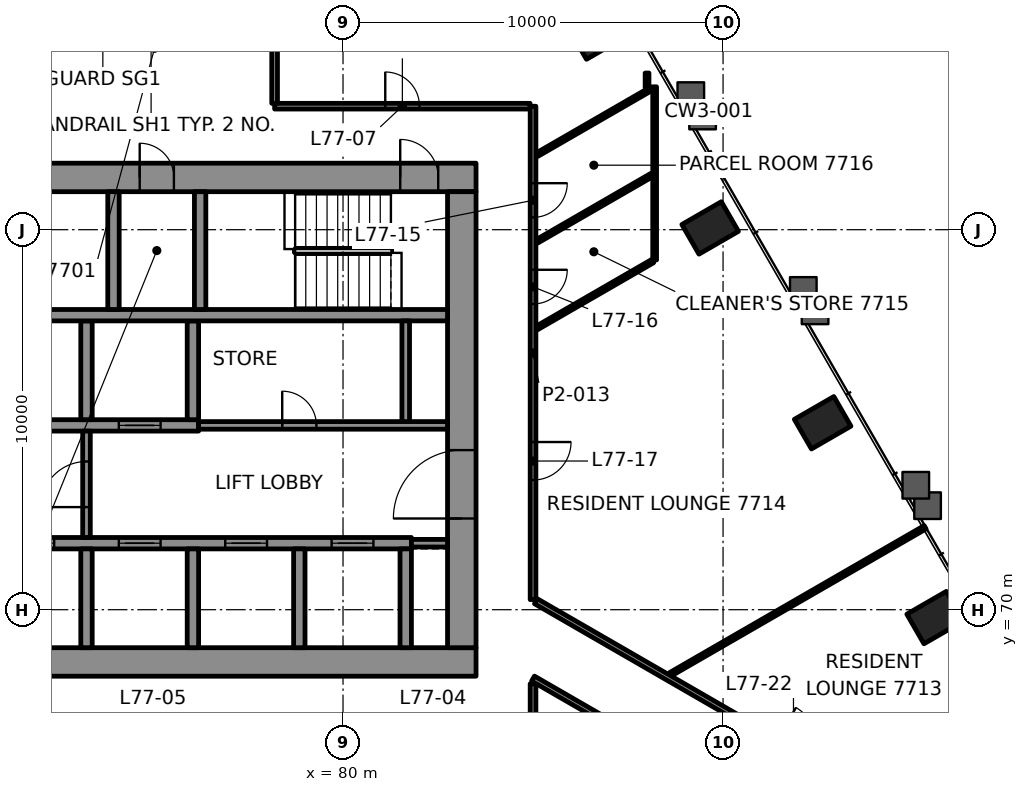
"""IFC4 building model, lengths in metres.
Left out: names, types, materials, properties, quantities, classifications, styles, units other than length and angle.
Written with IfcOpenShell. Run it as: python <this file> out.ifc"""

import sys

from ifc_helpers import new_model, si_unit, direction, frame, frame_2d, origin, origin_2d, place, context, subcontext, project, spatial, rectangle, hollow_rectangle, extrude, element, fill, save


model = new_model("IFC4")
c1 = context("Model", 3, precision=1e-05, world=origin(), true_north=direction((0.0, 1.0)))
c2 = subcontext(c1, "Body", "Model", "MODEL_VIEW")
j1 = project(units=[si_unit("LENGTHUNIT", "METRE"), si_unit("PLANEANGLEUNIT", "RADIAN")], contexts=[c1])
p1 = place(None, origin())
s1 = spatial("IfcSite", under=j1, at=p1, CompositionType="ELEMENT")
p2 = place(p1, origin())
s2 = spatial("IfcBuilding", under=s1, at=p2, CompositionType="ELEMENT")
p3 = place(p2, frame((0.0, 0.0, 316.1)))
s3 = spatial("IfcBuildingStorey", under=s2, at=p3, CompositionType="ELEMENT", Elevation=316.1)
for number, where, z_axis, x_axis in (
    (1, (95.581, 69.793, -0.0), (0.0, 0.0, 1.0), (-0.5, 0.866, 0.0)),
    (2, (92.621, 74.919, -0.0), (0.0, 0.0, 1.0), (-0.5, 0.866, 0.0)),
    (3, (89.661, 80.046, -0.0), (0.0, 0.0, 1.0), (-0.5, 0.866, 0.0)),
    (4, (86.701, 85.173, -0.0), (0.0, 0.0, 1.0), (-0.5, 0.866, 0.0)),
):
    element("IfcColumn", number, at=place(p3, frame(where, z_axis=z_axis, x_axis=x_axis)), inside=s3, PredefinedType="COLUMN", context=c2, shape_type="SweptSolid", body=[
        extrude(hollow_rectangle(XDim=0.9, YDim=1.2, WallThickness=0.06, at=origin_2d()), origin(), (0.0, 0.0, 1.0), 3.5),
    ])
p4 = place(p3, frame((66.5, 68.625, 0.0), z_axis=(0.0, 0.0, 1.0), x_axis=(1.0, 0.0, 0.0)))
e5 = element("IfcWall", 5, at=p4, inside=s3, PredefinedType="SHEAR", context=c2, shape_type="SweptSolid", body=[
    extrude(rectangle(XDim=17.0, YDim=0.75, at=frame_2d((8.5, 0.0))), origin(), (0.0, 0.0, 1.0), 3.3),
])
p5 = place(p4, frame((1.9, 0.0, 0.0)))
e6 = element("IfcOpeningElement", 6, at=p5, cuts=e5, PredefinedType="OPENING", context=c2, shape_type="SweptSolid", body=[
    extrude(rectangle(XDim=0.9, YDim=2.1, at=frame_2d((0.45, 1.05))), frame((0.0, 0.385, 0.0), z_axis=(0.0, -1.0, 0.0), x_axis=(1.0, 0.0, 0.0)), (0.0, 0.0, 1.0), 0.77),
])
p6 = place(p3, frame((66.5, 81.375, 0.0), z_axis=(0.0, 0.0, 1.0), x_axis=(1.0, 0.0, 0.0)))
e7 = element("IfcWall", 7, at=p6, inside=s3, PredefinedType="SHEAR", context=c2, shape_type="SweptSolid", body=[
    extrude(rectangle(XDim=17.0, YDim=0.75, at=frame_2d((8.5, 0.0))), origin(), (0.0, 0.0, 1.0), 3.3),
])
p7 = place(p6, frame((1.195, 0.0, 0.0)))
e8 = element("IfcOpeningElement", 8, at=p7, cuts=e7, PredefinedType="OPENING", context=c2, shape_type="SweptSolid", body=[
    extrude(rectangle(XDim=1.0, YDim=2.1, at=frame_2d((0.5, 1.05))), frame((0.0, 0.385, 0.0), z_axis=(0.0, -1.0, 0.0), x_axis=(1.0, 0.0, 0.0)), (0.0, 0.0, 1.0), 0.77),
])
p8 = place(p6, frame((15.005, 0.0, 0.0)))
e9 = element("IfcOpeningElement", 9, at=p8, cuts=e7, PredefinedType="OPENING", context=c2, shape_type="SweptSolid", body=[
    extrude(rectangle(XDim=1.0, YDim=2.1, at=frame_2d((0.5, 1.05))), frame((0.0, 0.385, 0.0), z_axis=(0.0, -1.0, 0.0), x_axis=(1.0, 0.0, 0.0)), (0.0, 0.0, 1.0), 0.77),
])
p9 = place(p6, frame((8.15, 0.0, 0.0)))
e10 = element("IfcOpeningElement", 10, at=p9, cuts=e7, PredefinedType="OPENING", context=c2, shape_type="SweptSolid", body=[
    extrude(rectangle(XDim=0.9, YDim=2.1, at=frame_2d((0.45, 1.05))), frame((0.0, 0.385, 0.0), z_axis=(0.0, -1.0, 0.0), x_axis=(1.0, 0.0, 0.0)), (0.0, 0.0, 1.0), 0.77),
])
p10 = place(p3, frame((83.125, 69.0, 0.0), z_axis=(0.0, 0.0, 1.0), x_axis=(0.0, 1.0, 0.0)))
e11 = element("IfcWall", 11, at=p10, inside=s3, PredefinedType="SHEAR", context=c2, shape_type="SweptSolid", body=[
    extrude(rectangle(XDim=12.0, YDim=0.75, at=frame_2d((6.0, 0.0))), origin(), (0.0, 0.0, 1.0), 3.3),
])
p11 = place(p10, frame((3.4, 0.0, 0.0)))
e12 = element("IfcOpeningElement", 12, at=p11, cuts=e11, PredefinedType="OPENING", context=c2, shape_type="SweptSolid", body=[
    extrude(rectangle(XDim=1.8, YDim=2.1, at=frame_2d((0.9, 1.05))), frame((0.0, 0.385, 0.0), z_axis=(0.0, -1.0, 0.0), x_axis=(1.0, 0.0, 0.0)), (0.0, 0.0, 1.0), 0.77),
])
p12 = place(p3, frame((70.3, 71.75, 0.0), z_axis=(0.0, 0.0, 1.0), x_axis=(1.0, 0.0, 0.0)))
e13 = element("IfcWall", 13, at=p12, inside=s3, PredefinedType="SHEAR", context=c2, shape_type="SweptSolid", body=[
    extrude(rectangle(XDim=11.5, YDim=0.3, at=frame_2d((5.75, 0.0))), origin(), (0.0, 0.0, 1.0), 3.3),
])
p13 = place(p12, frame((1.0, 0.0, 0.0)))
e14 = element("IfcOpeningElement", 14, at=p13, cuts=e13, PredefinedType="OPENING", context=c2, shape_type="SweptSolid", body=[
    extrude(rectangle(XDim=1.1, YDim=2.1, at=frame_2d((0.55, 1.05))), frame((0.0, 0.16, 0.0), z_axis=(0.0, -1.0, 0.0), x_axis=(1.0, 0.0, 0.0)), (0.0, 0.0, 1.0), 0.32),
])
p14 = place(p12, frame((3.8, 0.0, 0.0)))
e15 = element("IfcOpeningElement", 15, at=p14, cuts=e13, PredefinedType="OPENING", context=c2, shape_type="SweptSolid", body=[
    extrude(rectangle(XDim=1.1, YDim=2.1, at=frame_2d((0.55, 1.05))), frame((0.0, 0.16, 0.0), z_axis=(0.0, -1.0, 0.0), x_axis=(1.0, 0.0, 0.0)), (0.0, 0.0, 1.0), 0.32),
])
p15 = place(p12, frame((6.6, 0.0, 0.0)))
e16 = element("IfcOpeningElement", 16, at=p15, cuts=e13, PredefinedType="OPENING", context=c2, shape_type="SweptSolid", body=[
    extrude(rectangle(XDim=1.1, YDim=2.1, at=frame_2d((0.55, 1.05))), frame((0.0, 0.16, 0.0), z_axis=(0.0, -1.0, 0.0), x_axis=(1.0, 0.0, 0.0)), (0.0, 0.0, 1.0), 0.32),
])
p16 = place(p12, frame((9.4, 0.0, 0.0)))
e17 = element("IfcOpeningElement", 17, at=p16, cuts=e13, PredefinedType="OPENING", context=c2, shape_type="SweptSolid", body=[
    extrude(rectangle(XDim=1.1, YDim=2.1, at=frame_2d((0.55, 1.05))), frame((0.0, 0.16, 0.0), z_axis=(0.0, -1.0, 0.0), x_axis=(1.0, 0.0, 0.0)), (0.0, 0.0, 1.0), 0.32),
])
p17 = place(p3, frame((70.3, 74.85, 0.0), z_axis=(0.0, 0.0, 1.0), x_axis=(1.0, 0.0, 0.0)))
e18 = element("IfcWall", 18, at=p17, inside=s3, PredefinedType="SHEAR", context=c2, shape_type="SweptSolid", body=[
    extrude(rectangle(XDim=5.9, YDim=0.3, at=frame_2d((2.95, 0.0))), origin(), (0.0, 0.0, 1.0), 3.3),
])
p18 = place(p17, frame((3.8, 0.0, 0.0)))
e19 = element("IfcOpeningElement", 19, at=p18, cuts=e18, PredefinedType="OPENING", context=c2, shape_type="SweptSolid", body=[
    extrude(rectangle(XDim=1.1, YDim=2.1, at=frame_2d((0.55, 1.05))), frame((0.0, 0.16, 0.0), z_axis=(0.0, -1.0, 0.0), x_axis=(1.0, 0.0, 0.0)), (0.0, 0.0, 1.0), 0.32),
])
for number, where, z_axis, x_axis in (
    (20, (73.25, 69.0, 0.0), (0.0, 0.0, 1.0), (0.0, 1.0, 0.0)),
    (21, (73.25, 75.0, 0.0), (0.0, 0.0, 1.0), (0.0, 1.0, 0.0)),
    (22, (76.05, 69.0, 0.0), (0.0, 0.0, 1.0), (0.0, 1.0, 0.0)),
    (23, (76.05, 75.0, 0.0), (0.0, 0.0, 1.0), (0.0, 1.0, 0.0)),
    (24, (78.85, 69.0, 0.0), (0.0, 0.0, 1.0), (0.0, 1.0, 0.0)),
    (25, (81.65, 69.0, 0.0), (0.0, 0.0, 1.0), (0.0, 1.0, 0.0)),
):
    element("IfcWall", number, at=place(p3, frame(where, z_axis=z_axis, x_axis=x_axis)), inside=s3, PredefinedType="SHEAR", context=c2, shape_type="SweptSolid", body=[
        extrude(rectangle(XDim=2.6, YDim=0.3, at=frame_2d((1.3, 0.0))), origin(), (0.0, 0.0, 1.0), 3.3),
    ])
p19 = place(p3, frame((67.25, 77.75, 0.0), z_axis=(0.0, 0.0, 1.0), x_axis=(1.0, 0.0, 0.0)))
e26 = element("IfcWall", 26, at=p19, inside=s3, PredefinedType="SHEAR", context=c2, shape_type="SweptSolid", body=[
    extrude(rectangle(XDim=15.5, YDim=0.3, at=frame_2d((7.75, 0.0))), origin(), (0.0, 0.0, 1.0), 3.3),
])
p20 = place(p19, frame((0.445, 0.0, 0.0)))
e27 = element("IfcOpeningElement", 27, at=p20, cuts=e26, PredefinedType="OPENING", context=c2, shape_type="SweptSolid", body=[
    extrude(rectangle(XDim=1.0, YDim=2.1, at=frame_2d((0.5, 1.05))), frame((0.0, 0.16, 0.0), z_axis=(0.0, -1.0, 0.0), x_axis=(1.0, 0.0, 0.0)), (0.0, 0.0, 1.0), 0.32),
])
for number, where, z_axis, x_axis in (
    (28, (73.96, 77.9, 0.0), (0.0, 0.0, 1.0), (0.0, 1.0, 0.0)),
    (29, (76.24, 77.9, 0.0), (0.0, 0.0, 1.0), (0.0, 1.0, 0.0)),
):
    element("IfcWall", number, at=place(p3, frame(where, z_axis=z_axis, x_axis=x_axis)), inside=s3, PredefinedType="SHEAR", context=c2, shape_type="SweptSolid", body=[
        extrude(rectangle(XDim=3.1, YDim=0.3, at=frame_2d((1.55, 0.0))), origin(), (0.0, 0.0, 1.0), 3.3),
    ])
p21 = place(p3, frame((78.2, 83.25, 0.0), z_axis=(0.0, 0.0, 1.0), x_axis=(1.0, 0.0, 0.0)))
e30 = element("IfcWall", 30, at=p21, inside=s3, PredefinedType="PARTITIONING", context=c2, shape_type="SweptSolid", body=[
    extrude(rectangle(XDim=6.723, YDim=0.15, at=frame_2d((3.362, 0.0))), origin(), (0.0, 0.0, 1.0), 2.7),
])
p22 = place(p21, frame((2.911, 0.0, 0.0)))
e31 = element("IfcOpeningElement", 31, at=p22, cuts=e30, PredefinedType="OPENING", context=c2, shape_type="SweptSolid", body=[
    extrude(rectangle(XDim=0.9, YDim=2.1, at=frame_2d((0.45, 1.05))), frame((0.0, 0.085, 0.0), z_axis=(0.0, -1.0, 0.0), x_axis=(1.0, 0.0, 0.0)), (0.0, 0.0, 1.0), 0.17),
])
p23 = place(p3, frame((88.611, 68.298, 0.0), z_axis=(0.0, 0.0, 1.0), x_axis=(0.866026493871, 0.499998111909, 0.0)))
e32 = element("IfcWall", 32, at=p23, inside=s3, PredefinedType="PARTITIONING", context=c2, shape_type="SweptSolid", body=[
    extrude(rectangle(XDim=7.743, YDim=0.1, at=frame_2d((3.872, 0.0))), origin(), (0.0, 0.0, 1.0), 2.688),
])
p24 = place(p3, frame((85.101, 77.414, 0.0), z_axis=(0.0, 0.0, 1.0), x_axis=(0.866041242935, 0.499972564782, 0.0)))
e33 = element("IfcWall", 33, at=p24, inside=s3, PredefinedType="PARTITIONING", context=c2, shape_type="SweptSolid", body=[
    extrude(rectangle(XDim=3.521, YDim=0.1, at=frame_2d((1.76, 0.0))), origin(), (0.0, 0.0, 1.0), 2.7),
])
p25 = place(p3, frame((85.101, 79.692, 0.0), z_axis=(0.0, 0.0, 1.0), x_axis=(0.866017863565, 0.500013059815, 0.0)))
e34 = element("IfcWall", 34, at=p25, inside=s3, PredefinedType="PARTITIONING", context=c2, shape_type="SweptSolid", body=[
    extrude(rectangle(XDim=3.491, YDim=0.1, at=frame_2d((1.745, 0.0))), origin(), (0.0, 0.0, 1.0), 2.7),
])
p26 = place(p3, frame((85.101, 81.971, 0.0), z_axis=(0.0, 0.0, 1.0), x_axis=(0.866017863565, 0.500013059815, 0.0)))
e35 = element("IfcWall", 35, at=p26, inside=s3, PredefinedType="PARTITIONING", context=c2, shape_type="SweptSolid", body=[
    extrude(rectangle(XDim=3.491, YDim=0.1, at=frame_2d((1.745, 0.0))), origin(), (0.0, 0.0, 1.0), 2.688),
])
p27 = place(p3, frame((88.2, 79.203, 0.0), z_axis=(0.0, 0.0, 1.0), x_axis=(0.0, 1.0, 0.0)))
e36 = element("IfcWall", 36, at=p27, inside=s3, PredefinedType="PARTITIONING", context=c2, shape_type="SweptSolid", body=[
    extrude(rectangle(XDim=4.557, YDim=0.1, at=frame_2d((2.279, 0.0))), origin(), (0.0, 0.0, 1.0), 2.688),
])
p28 = place(p3, frame((88.0, 83.733, 0.0), z_axis=(0.0, 0.0, 1.0), x_axis=(0.0, 1.0, 0.0)))
e37 = element("IfcWall", 37, at=p28, inside=s3, PredefinedType="PARTITIONING", context=c2, shape_type="SweptSolid", body=[
    extrude(rectangle(XDim=0.39, YDim=0.1, at=frame_2d((0.195, 0.0))), origin(), (0.0, 0.0, 1.0), 2.7),
])
p29 = place(p3, frame((85.0, 66.825, 0.0), z_axis=(0.0, 0.0, 1.0), x_axis=(0.0, 1.0, 0.0)))
e38 = element("IfcWall", 38, at=p29, inside=s3, PredefinedType="PARTITIONING", context=c2, shape_type="SweptSolid", body=[
    extrude(rectangle(XDim=1.226, YDim=0.15, at=frame_2d((0.613, 0.0))), origin(), (0.0, 0.0, 1.0), 2.697),
])
p30 = place(p3, frame((85.0, 83.248, 0.0), z_axis=(0.0, 0.0, 1.0), x_axis=(0.0, -1.0, 0.0)))
e39 = element("IfcWall", 39, at=p30, inside=s3, PredefinedType="PARTITIONING", context=c2, shape_type="SweptSolid", body=[
    extrude(rectangle(XDim=12.982, YDim=0.15, at=frame_2d((6.491, 0.0))), origin(), (0.0, 0.0, 1.0), 2.7),
])
p31 = place(p30, frame((2.024, 0.0, 0.0)))
e40 = element("IfcOpeningElement", 40, at=p31, cuts=e39, PredefinedType="OPENING", context=c2, shape_type="SweptSolid", body=[
    extrude(rectangle(XDim=0.9, YDim=2.1, at=frame_2d((0.45, 1.05))), frame((0.0, 0.085, 0.0), z_axis=(0.0, -1.0, 0.0), x_axis=(1.0, 0.0, 0.0)), (0.0, 0.0, 1.0), 0.17),
])
p32 = place(p30, frame((4.303, 0.0, 0.0)))
e41 = element("IfcOpeningElement", 41, at=p32, cuts=e39, PredefinedType="OPENING", context=c2, shape_type="SweptSolid", body=[
    extrude(rectangle(XDim=0.9, YDim=2.1, at=frame_2d((0.45, 1.05))), frame((0.0, 0.085, 0.0), z_axis=(0.0, -1.0, 0.0), x_axis=(1.0, 0.0, 0.0)), (0.0, 0.0, 1.0), 0.17),
])
p33 = place(p30, frame((8.836, 0.0, 0.0)))
e42 = element("IfcOpeningElement", 42, at=p33, cuts=e39, PredefinedType="OPENING", context=c2, shape_type="SweptSolid", body=[
    extrude(rectangle(XDim=1.0, YDim=2.1, at=frame_2d((0.5, 1.05))), frame((0.0, 0.085, 0.0), z_axis=(0.0, -1.0, 0.0), x_axis=(1.0, 0.0, 0.0)), (0.0, 0.0, 1.0), 0.17),
])
p34 = place(p3, frame((78.2, 83.325, 0.0), z_axis=(0.0, 0.0, 1.0), x_axis=(0.0, 1.0, 0.0)))
e43 = element("IfcWall", 43, at=p34, inside=s3, PredefinedType="PARTITIONING", context=c2, shape_type="SweptSolid", body=[
    extrude(rectangle(XDim=2.975, YDim=0.15, at=frame_2d((1.488, 0.0))), origin(), (0.0, 0.0, 1.0), 2.7),
])
p35 = place(p3, frame((85.075, 70.222, 0.0), z_axis=(0.0, 0.0, 1.0), x_axis=(0.866032051089, -0.499988486354, 0.0)))
e44 = element("IfcWall", 44, at=p35, inside=s3, PredefinedType="PARTITIONING", context=c2, shape_type="SweptSolid", body=[
    extrude(rectangle(XDim=11.889, YDim=0.15, at=frame_2d((5.945, 0.0))), origin(), (0.0, 0.0, 1.0), 2.7),
])
p36 = place(p35, frame((7.326, 0.0, 0.0)))
e45 = element("IfcOpeningElement", 45, at=p36, cuts=e44, PredefinedType="OPENING", context=c2, shape_type="SweptSolid", body=[
    extrude(rectangle(XDim=1.0, YDim=2.1, at=frame_2d((0.5, 1.05))), frame((0.0, 0.085, 0.0), z_axis=(0.0, -1.0, 0.0), x_axis=(1.0, 0.0, 0.0)), (0.0, 0.0, 1.0), 0.17),
])
p37 = place(p3, frame((94.472, 62.719, 0.0), z_axis=(0.0, 0.0, 1.0), x_axis=(-0.866029834468, 0.499992325753, 0.0)))
e46 = element("IfcWall", 46, at=p37, inside=s3, PredefinedType="PARTITIONING", context=c2, shape_type="SweptSolid", body=[
    extrude(rectangle(XDim=10.937, YDim=0.15, at=frame_2d((5.469, 0.0))), origin(), (0.0, 0.0, 1.0), 2.697),
])
p38 = place(p3, frame((81.8, 71.75, 0.0), z_axis=(0.0, 0.0, 1.0), x_axis=(1.0, 0.0, 0.0)))
e47 = element("IfcWall", 47, at=p38, inside=s3, PredefinedType="PARTITIONING", context=c2, shape_type="SweptSolid", body=[
    extrude(rectangle(XDim=0.95, YDim=0.2, at=frame_2d((0.475, 0.0))), origin(), (0.0, 0.0, 1.0), 3.3),
])
p39 = place(p3, frame((76.2, 74.85, 0.0), z_axis=(0.0, 0.0, 1.0), x_axis=(1.0, 0.0, 0.0)))
e48 = element("IfcWall", 48, at=p39, inside=s3, PredefinedType="PARTITIONING", context=c2, shape_type="SweptSolid", body=[
    extrude(rectangle(XDim=6.55, YDim=0.2, at=frame_2d((3.275, 0.0))), origin(), (0.0, 0.0, 1.0), 3.3),
])
p40 = place(p39, frame((2.2, 0.0, 0.0)))
e49 = element("IfcOpeningElement", 49, at=p40, cuts=e48, PredefinedType="OPENING", context=c2, shape_type="SweptSolid", body=[
    extrude(rectangle(XDim=0.9, YDim=2.1, at=frame_2d((0.45, 1.05))), frame((0.0, 0.11, 0.0), z_axis=(0.0, -1.0, 0.0), x_axis=(1.0, 0.0, 0.0)), (0.0, 0.0, 1.0), 0.22),
])
p41 = place(p3, frame((73.25, 71.9, 0.0), z_axis=(0.0, 0.0, 1.0), x_axis=(0.0, 1.0, 0.0)))
e50 = element("IfcWall", 50, at=p41, inside=s3, PredefinedType="PARTITIONING", context=c2, shape_type="SweptSolid", body=[
    extrude(rectangle(XDim=2.8, YDim=0.2, at=frame_2d((1.4, 0.0))), origin(), (0.0, 0.0, 1.0), 3.3),
])
p42 = place(p41, frame((0.8, 0.0, 0.0)))
e51 = element("IfcOpeningElement", 51, at=p42, cuts=e50, PredefinedType="OPENING", context=c2, shape_type="SweptSolid", body=[
    extrude(rectangle(XDim=1.2, YDim=2.1, at=frame_2d((0.6, 1.05))), frame((0.0, 0.11, 0.0), z_axis=(0.0, -1.0, 0.0), x_axis=(1.0, 0.0, 0.0)), (0.0, 0.0, 1.0), 0.22),
])
p43 = place(p3, frame((81.65, 74.95, 0.0), z_axis=(0.0, 0.0, 1.0), x_axis=(0.0, 1.0, 0.0)))
e52 = element("IfcWall", 52, at=p43, inside=s3, PredefinedType="PARTITIONING", context=c2, shape_type="SweptSolid", body=[
    extrude(rectangle(XDim=2.65, YDim=0.2, at=frame_2d((1.325, 0.0))), origin(), (0.0, 0.0, 1.0), 3.3),
])
p44 = place(p22, origin())
e53 = element("IfcDoor", 53, at=p44, inside=s3, OperationType="SINGLE_SWING_RIGHT", PredefinedType="DOOR", context=c2, shape_type="SweptSolid", body=[
    extrude(rectangle(XDim=0.9, YDim=2.1, at=frame_2d((0.45, 1.05))), frame((0.0, 0.025, 0.0), z_axis=(0.0, -1.0, 0.0), x_axis=(1.0, 0.0, 0.0)), (0.0, 0.0, 1.0), 0.05),
])
fill(e31, e53)
p45 = place(p31, origin())
e54 = element("IfcDoor", 54, at=p45, inside=s3, OperationType="SINGLE_SWING_RIGHT", PredefinedType="DOOR", context=c2, shape_type="SweptSolid", body=[
    extrude(rectangle(XDim=0.9, YDim=2.1, at=frame_2d((0.45, 1.05))), frame((0.0, 0.025, 0.0), z_axis=(0.0, -1.0, 0.0), x_axis=(1.0, 0.0, 0.0)), (0.0, 0.0, 1.0), 0.05),
])
fill(e40, e54)
p46 = place(p32, origin())
e55 = element("IfcDoor", 55, at=p46, inside=s3, OperationType="SINGLE_SWING_LEFT", PredefinedType="DOOR", context=c2, shape_type="SweptSolid", body=[
    extrude(rectangle(XDim=0.9, YDim=2.1, at=frame_2d((0.45, 1.05))), frame((0.0, 0.025, 0.0), z_axis=(0.0, -1.0, 0.0), x_axis=(1.0, 0.0, 0.0)), (0.0, 0.0, 1.0), 0.05),
])
fill(e41, e55)
p47 = place(p33, origin())
e56 = element("IfcDoor", 56, at=p47, inside=s3, OperationType="SINGLE_SWING_RIGHT", PredefinedType="DOOR", context=c2, shape_type="SweptSolid", body=[
    extrude(rectangle(XDim=1.0, YDim=2.1, at=frame_2d((0.5, 1.05))), frame((0.0, 0.025, 0.0), z_axis=(0.0, -1.0, 0.0), x_axis=(1.0, 0.0, 0.0)), (0.0, 0.0, 1.0), 0.05),
])
fill(e42, e56)
p48 = place(p13, origin())
e57 = element("IfcDoor", 57, at=p48, inside=s3, OperationType="DOUBLE_DOOR_SLIDING", PredefinedType="DOOR", context=c2, shape_type="SweptSolid", body=[
    extrude(rectangle(XDim=1.1, YDim=2.1, at=frame_2d((0.55, 1.05))), frame((0.0, 0.025, 0.0), z_axis=(0.0, -1.0, 0.0), x_axis=(1.0, 0.0, 0.0)), (0.0, 0.0, 1.0), 0.05),
])
fill(e14, e57)
p49 = place(p14, origin())
e58 = element("IfcDoor", 58, at=p49, inside=s3, OperationType="DOUBLE_DOOR_SLIDING", PredefinedType="DOOR", context=c2, shape_type="SweptSolid", body=[
    extrude(rectangle(XDim=1.1, YDim=2.1, at=frame_2d((0.55, 1.05))), frame((0.0, 0.025, 0.0), z_axis=(0.0, -1.0, 0.0), x_axis=(1.0, 0.0, 0.0)), (0.0, 0.0, 1.0), 0.05),
])
fill(e15, e58)
p50 = place(p15, origin())
e59 = element("IfcDoor", 59, at=p50, inside=s3, OperationType="DOUBLE_DOOR_SLIDING", PredefinedType="DOOR", context=c2, shape_type="SweptSolid", body=[
    extrude(rectangle(XDim=1.1, YDim=2.1, at=frame_2d((0.55, 1.05))), frame((0.0, 0.025, 0.0), z_axis=(0.0, -1.0, 0.0), x_axis=(1.0, 0.0, 0.0)), (0.0, 0.0, 1.0), 0.05),
])
fill(e16, e59)
p51 = place(p16, origin())
e60 = element("IfcDoor", 60, at=p51, inside=s3, OperationType="DOUBLE_DOOR_SLIDING", PredefinedType="DOOR", context=c2, shape_type="SweptSolid", body=[
    extrude(rectangle(XDim=1.1, YDim=2.1, at=frame_2d((0.55, 1.05))), frame((0.0, 0.025, 0.0), z_axis=(0.0, -1.0, 0.0), x_axis=(1.0, 0.0, 0.0)), (0.0, 0.0, 1.0), 0.05),
])
fill(e17, e60)
p52 = place(p18, origin())
e61 = element("IfcDoor", 61, at=p52, inside=s3, OperationType="DOUBLE_DOOR_SLIDING", PredefinedType="DOOR", context=c2, shape_type="SweptSolid", body=[
    extrude(rectangle(XDim=1.1, YDim=2.1, at=frame_2d((0.55, 1.05))), frame((0.0, 0.025, 0.0), z_axis=(0.0, -1.0, 0.0), x_axis=(1.0, 0.0, 0.0)), (0.0, 0.0, 1.0), 0.05),
])
fill(e19, e61)
p53 = place(p8, origin())
e62 = element("IfcDoor", 62, at=p53, inside=s3, OperationType="SINGLE_SWING_LEFT", PredefinedType="DOOR", context=c2, shape_type="SweptSolid", body=[
    extrude(rectangle(XDim=1.0, YDim=2.1, at=frame_2d((0.5, 1.05))), frame((0.0, 0.095, 0.0), z_axis=(0.0, -1.0, 0.0), x_axis=(1.0, 0.0, 0.0)), (0.0, 0.0, 1.0), 0.19),
])
fill(e9, e62)
p54 = place(p42, origin())
e63 = element("IfcDoor", 63, at=p54, inside=s3, OperationType="SINGLE_SWING_LEFT", PredefinedType="DOOR", context=c2, shape_type="SweptSolid", body=[
    extrude(rectangle(XDim=1.2, YDim=2.1, at=frame_2d((0.6, 1.05))), frame((0.0, 0.025, 0.0), z_axis=(0.0, -1.0, 0.0), x_axis=(1.0, 0.0, 0.0)), (0.0, 0.0, 1.0), 0.05),
])
fill(e51, e63)
p55 = place(p11, origin())
e64 = element("IfcDoor", 64, at=p55, inside=s3, OperationType="SINGLE_SWING_LEFT", PredefinedType="DOOR", context=c2, shape_type="SweptSolid", body=[
    extrude(rectangle(XDim=1.8, YDim=2.1, at=frame_2d((0.9, 1.05))), frame((0.0, 0.095, 0.0), z_axis=(0.0, -1.0, 0.0), x_axis=(1.0, 0.0, 0.0)), (0.0, 0.0, 1.0), 0.19),
])
fill(e12, e64)
p56 = place(p40, origin())
e65 = element("IfcDoor", 65, at=p56, inside=s3, OperationType="SINGLE_SWING_LEFT", PredefinedType="DOOR", context=c2, shape_type="SweptSolid", body=[
    extrude(rectangle(XDim=0.9, YDim=2.1, at=frame_2d((0.45, 1.05))), frame((0.0, 0.025, 0.0), z_axis=(0.0, -1.0, 0.0), x_axis=(1.0, 0.0, 0.0)), (0.0, 0.0, 1.0), 0.05),
])
fill(e49, e65)
p57 = place(p9, origin())
e66 = element("IfcDoor", 66, at=p57, inside=s3, OperationType="SINGLE_SWING_RIGHT", PredefinedType="DOOR", context=c2, shape_type="SweptSolid", body=[
    extrude(rectangle(XDim=0.9, YDim=2.1, at=frame_2d((0.45, 1.05))), frame((0.0, 0.095, 0.0), z_axis=(0.0, -1.0, 0.0), x_axis=(1.0, 0.0, 0.0)), (0.0, 0.0, 1.0), 0.19),
])
fill(e10, e66)
save(model, sys.argv[1])
